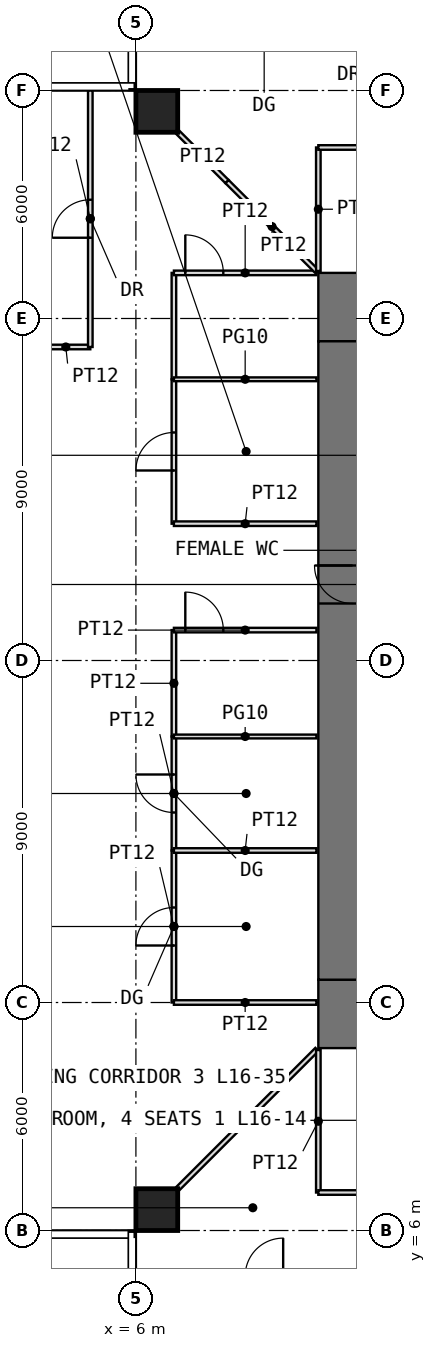
"""IFC4 building model, lengths in metres.
Left out: names, types, materials, properties, quantities, classifications, styles, units other than length and angle.
Written with IfcOpenShell. Run it as: python <this file> out.ifc"""

import sys

from ifc_helpers import new_model, si_unit, direction, frame, frame_2d, origin, origin_2d, place, context, subcontext, project, spatial, rectangle, extrude, element, fill, save


model = new_model("IFC4")
c1 = context("Model", 3, precision=1e-05, world=origin(), true_north=direction((0.0, 1.0)))
c2 = subcontext(c1, "Body", "Model", "MODEL_VIEW")
j1 = project(units=[si_unit("LENGTHUNIT", "METRE"), si_unit("PLANEANGLEUNIT", "RADIAN")], contexts=[c1])
p1 = place(None, origin())
s1 = spatial("IfcSite", under=j1, at=p1, CompositionType="ELEMENT")
p2 = place(p1, origin())
s2 = spatial("IfcBuilding", under=s1, at=p2, CompositionType="ELEMENT")
p3 = place(p2, frame((0.0, 0.0, 70.5)))
s3 = spatial("IfcBuildingStorey", under=s2, at=p3, CompositionType="ELEMENT", Elevation=70.5)
for number, where, z_axis, x_axis in (
    (1, (6.55, 6.55, 0.0), (0.0, 0.0, 1.0), (1.0, 0.0, 0.0)),
    (2, (6.55, 35.45, 0.0), (0.0, 0.0, 1.0), (1.0, 0.0, 0.0)),
):
    element("IfcColumn", number, at=place(p3, frame(where, z_axis=z_axis, x_axis=x_axis)), inside=s3, PredefinedType="COLUMN", context=c2, shape_type="SweptSolid", body=[
        extrude(rectangle(XDim=1.1, YDim=1.1, at=origin_2d()), origin(), (0.0, 0.0, 1.0), 4.0),
    ])
p4 = place(p3, frame((10.8, 11.7, -0.05), z_axis=(0.0, 0.0, 1.0), x_axis=(1.0, 0.0, 0.0)))
e3 = element("IfcWall", 3, at=p4, inside=s3, PredefinedType="SHEAR", context=c2, shape_type="SweptSolid", body=[
    extrude(rectangle(XDim=20.4, YDim=1.8, at=frame_2d((10.2, 0.0))), origin(), (0.0, 0.0, 1.0), 4.0),
])
p5 = place(p4, frame((9.2, 0.0, 0.05)))
e4 = element("IfcOpeningElement", 4, at=p5, cuts=e3, PredefinedType="OPENING", context=c2, shape_type="SweptSolid", body=[
    extrude(rectangle(XDim=2.0, YDim=2.2, at=frame_2d((1.0, 1.1))), frame((0.0, 0.91, 0.0), z_axis=(0.0, -1.0, 0.0), x_axis=(1.0, 0.0, 0.0)), (0.0, 0.0, 1.0), 1.82),
])
p6 = place(p3, frame((10.8, 30.3, -0.05), z_axis=(0.0, 0.0, 1.0), x_axis=(1.0, 0.0, 0.0)))
e5 = element("IfcWall", 5, at=p6, inside=s3, PredefinedType="SHEAR", context=c2, shape_type="SweptSolid", body=[
    extrude(rectangle(XDim=20.4, YDim=1.8, at=frame_2d((10.2, 0.0))), origin(), (0.0, 0.0, 1.0), 4.0),
])
p7 = place(p6, frame((9.2, 0.0, 0.05)))
e6 = element("IfcOpeningElement", 6, at=p7, cuts=e5, PredefinedType="OPENING", context=c2, shape_type="SweptSolid", body=[
    extrude(rectangle(XDim=2.0, YDim=2.2, at=frame_2d((1.0, 1.1))), frame((0.0, 0.91, 0.0), z_axis=(0.0, -1.0, 0.0), x_axis=(1.0, 0.0, 0.0)), (0.0, 0.0, 1.0), 1.82),
])
p8 = place(p3, frame((11.7, 12.6, -0.05), z_axis=(0.0, 0.0, 1.0), x_axis=(0.0, 1.0, 0.0)))
e7 = element("IfcWall", 7, at=p8, inside=s3, PredefinedType="SHEAR", context=c2, shape_type="SweptSolid", body=[
    extrude(rectangle(XDim=16.8, YDim=1.8, at=frame_2d((8.4, 0.0))), origin(), (0.0, 0.0, 1.0), 4.0),
])
p9 = place(p8, frame((9.9, 0.0, 0.05)))
e8 = element("IfcOpeningElement", 8, at=p9, cuts=e7, PredefinedType="OPENING", context=c2, shape_type="SweptSolid", body=[
    extrude(rectangle(XDim=1.0, YDim=2.2, at=frame_2d((0.5, 1.1))), frame((0.0, 0.91, 0.0), z_axis=(0.0, -1.0, 0.0), x_axis=(1.0, 0.0, 0.0)), (0.0, 0.0, 1.0), 1.82),
])
p10 = place(p3, frame((3.51, 29.25, 0.0), z_axis=(0.0, 0.0, 1.0), x_axis=(1.0, 0.0, 0.0)))
e9 = element("IfcWall", 9, at=p10, inside=s3, PredefinedType="PARTITIONING", context=c2, shape_type="SweptSolid", body=[
    extrude(rectangle(XDim=1.29, YDim=0.12, at=frame_2d((0.645, 0.0))), origin(), (0.0, 0.0, 1.0), 3.75),
])
p11 = place(p3, frame((4.8, 29.25, 0.0), z_axis=(0.0, 0.0, 1.0), x_axis=(0.0, 1.0, 0.0)))
e10 = element("IfcWall", 10, at=p11, inside=s3, PredefinedType="PARTITIONING", context=c2, shape_type="SweptSolid", body=[
    extrude(rectangle(XDim=6.75, YDim=0.12, at=frame_2d((3.375, 0.0))), origin(), (0.0, 0.0, 1.0), 3.75),
])
p12 = place(p11, frame((2.875, 0.0, 0.0)))
e11 = element("IfcOpeningElement", 11, at=p12, cuts=e10, PredefinedType="OPENING", context=c2, shape_type="SweptSolid", body=[
    extrude(rectangle(XDim=1.0, YDim=2.2, at=frame_2d((0.5, 1.1))), frame((0.0, 0.07, 0.0), z_axis=(0.0, -1.0, 0.0), x_axis=(1.0, 0.0, 0.0)), (0.0, 0.0, 1.0), 0.14),
])
p13 = place(p3, frame((7.0, 12.0, 0.0), z_axis=(0.0, 0.0, 1.0), x_axis=(0.0, 1.0, 0.0)))
e12 = element("IfcWall", 12, at=p13, inside=s3, PredefinedType="PARTITIONING", context=c2, shape_type="SweptSolid", body=[
    extrude(rectangle(XDim=4.0, YDim=0.12, at=frame_2d((2.0, 0.0))), origin(), (0.0, 0.0, 1.0), 3.75),
])
p14 = place(p13, frame((1.5, 0.0, 0.0)))
e13 = element("IfcOpeningElement", 13, at=p14, cuts=e12, PredefinedType="OPENING", context=c2, shape_type="SweptSolid", body=[
    extrude(rectangle(XDim=1.0, YDim=2.4, at=frame_2d((0.5, 1.2))), frame((0.0, 0.07, 0.0), z_axis=(0.0, -1.0, 0.0), x_axis=(1.0, 0.0, 0.0)), (0.0, 0.0, 1.0), 0.14),
])
p15 = place(p3, frame((7.0, 12.0, 0.0), z_axis=(0.0, 0.0, 1.0), x_axis=(1.0, 0.0, 0.0)))
e14 = element("IfcWall", 14, at=p15, inside=s3, PredefinedType="PARTITIONING", context=c2, shape_type="SweptSolid", body=[
    extrude(rectangle(XDim=3.75, YDim=0.12, at=frame_2d((1.875, 0.0))), origin(), (0.0, 0.0, 1.0), 3.75),
])
p16 = place(p3, frame((7.0, 16.0, 0.0), z_axis=(0.0, 0.0, 1.0), x_axis=(0.0, 1.0, 0.0)))
e15 = element("IfcWall", 15, at=p16, inside=s3, PredefinedType="PARTITIONING", context=c2, shape_type="SweptSolid", body=[
    extrude(rectangle(XDim=3.0, YDim=0.12, at=frame_2d((1.5, 0.0))), origin(), (0.0, 0.0, 1.0), 3.75),
])
p17 = place(p16, frame((1.0, 0.0, 0.0)))
e16 = element("IfcOpeningElement", 16, at=p17, cuts=e15, PredefinedType="OPENING", context=c2, shape_type="SweptSolid", body=[
    extrude(rectangle(XDim=1.0, YDim=2.4, at=frame_2d((0.5, 1.2))), frame((0.0, 0.07, 0.0), z_axis=(0.0, -1.0, 0.0), x_axis=(1.0, 0.0, 0.0)), (0.0, 0.0, 1.0), 0.14),
])
p18 = place(p3, frame((7.0, 16.0, 0.0), z_axis=(0.0, 0.0, 1.0), x_axis=(1.0, 0.0, 0.0)))
e17 = element("IfcWall", 17, at=p18, inside=s3, PredefinedType="PARTITIONING", context=c2, shape_type="SweptSolid", body=[
    extrude(rectangle(XDim=3.75, YDim=0.12, at=frame_2d((1.875, 0.0))), origin(), (0.0, 0.0, 1.0), 3.75),
])
p19 = place(p3, frame((7.0, 19.0, 0.0), z_axis=(0.0, 0.0, 1.0), x_axis=(0.0, 1.0, 0.0)))
e18 = element("IfcWall", 18, at=p19, inside=s3, PredefinedType="PARTITIONING", context=c2, shape_type="SweptSolid", body=[
    extrude(rectangle(XDim=2.8, YDim=0.12, at=frame_2d((1.4, 0.0))), origin(), (0.0, 0.0, 1.0), 3.75),
])
p20 = place(p3, frame((7.0, 19.0, 0.0), z_axis=(0.0, 0.0, 1.0), x_axis=(1.0, 0.0, 0.0)))
e19 = element("IfcWall", 19, at=p20, inside=s3, PredefinedType="PARTITIONING", context=c2, shape_type="SweptSolid", body=[
    extrude(rectangle(XDim=3.75, YDim=0.1, at=frame_2d((1.875, 0.0))), origin(), (0.0, 0.0, 1.0), 3.75),
])
p21 = place(p3, frame((7.0, 21.8, 0.0), z_axis=(0.0, 0.0, 1.0), x_axis=(1.0, 0.0, 0.0)))
e20 = element("IfcWall", 20, at=p21, inside=s3, PredefinedType="PARTITIONING", context=c2, shape_type="SweptSolid", body=[
    extrude(rectangle(XDim=3.75, YDim=0.12, at=frame_2d((1.875, 0.0))), origin(), (0.0, 0.0, 1.0), 3.75),
])
p22 = place(p21, frame((0.3, 0.0, 0.0)))
e21 = element("IfcOpeningElement", 21, at=p22, cuts=e20, PredefinedType="OPENING", context=c2, shape_type="SweptSolid", body=[
    extrude(rectangle(XDim=1.0, YDim=2.4, at=frame_2d((0.5, 1.2))), frame((0.0, 0.07, 0.0), z_axis=(0.0, -1.0, 0.0), x_axis=(1.0, 0.0, 0.0)), (0.0, 0.0, 1.0), 0.14),
])
p23 = place(p3, frame((7.0, 24.6, 0.0), z_axis=(0.0, 0.0, 1.0), x_axis=(0.0, 1.0, 0.0)))
e22 = element("IfcWall", 22, at=p23, inside=s3, PredefinedType="PARTITIONING", context=c2, shape_type="SweptSolid", body=[
    extrude(rectangle(XDim=3.8, YDim=0.12, at=frame_2d((1.9, 0.0))), origin(), (0.0, 0.0, 1.0), 3.75),
])
p24 = place(p23, frame((1.4, 0.0, 0.0)))
e23 = element("IfcOpeningElement", 23, at=p24, cuts=e22, PredefinedType="OPENING", context=c2, shape_type="SweptSolid", body=[
    extrude(rectangle(XDim=1.0, YDim=2.4, at=frame_2d((0.5, 1.2))), frame((0.0, 0.07, 0.0), z_axis=(0.0, -1.0, 0.0), x_axis=(1.0, 0.0, 0.0)), (0.0, 0.0, 1.0), 0.14),
])
p25 = place(p3, frame((7.0, 24.6, 0.0), z_axis=(0.0, 0.0, 1.0), x_axis=(1.0, 0.0, 0.0)))
e24 = element("IfcWall", 24, at=p25, inside=s3, PredefinedType="PARTITIONING", context=c2, shape_type="SweptSolid", body=[
    extrude(rectangle(XDim=3.75, YDim=0.12, at=frame_2d((1.875, 0.0))), origin(), (0.0, 0.0, 1.0), 3.75),
])
p26 = place(p3, frame((7.0, 28.4, 0.0), z_axis=(0.0, 0.0, 1.0), x_axis=(0.0, 1.0, 0.0)))
e25 = element("IfcWall", 25, at=p26, inside=s3, PredefinedType="PARTITIONING", context=c2, shape_type="SweptSolid", body=[
    extrude(rectangle(XDim=2.8, YDim=0.12, at=frame_2d((1.4, 0.0))), origin(), (0.0, 0.0, 1.0), 3.75),
])
p27 = place(p3, frame((7.0, 28.4, 0.0), z_axis=(0.0, 0.0, 1.0), x_axis=(1.0, 0.0, 0.0)))
e26 = element("IfcWall", 26, at=p27, inside=s3, PredefinedType="PARTITIONING", context=c2, shape_type="SweptSolid", body=[
    extrude(rectangle(XDim=3.75, YDim=0.1, at=frame_2d((1.875, 0.0))), origin(), (0.0, 0.0, 1.0), 3.75),
])
p28 = place(p3, frame((7.0, 31.2, 0.0), z_axis=(0.0, 0.0, 1.0), x_axis=(1.0, 0.0, 0.0)))
e27 = element("IfcWall", 27, at=p28, inside=s3, PredefinedType="PARTITIONING", context=c2, shape_type="SweptSolid", body=[
    extrude(rectangle(XDim=3.75, YDim=0.12, at=frame_2d((1.875, 0.0))), origin(), (0.0, 0.0, 1.0), 3.75),
])
p29 = place(p28, frame((0.3, 0.0, 0.0)))
e28 = element("IfcOpeningElement", 28, at=p29, cuts=e27, PredefinedType="OPENING", context=c2, shape_type="SweptSolid", body=[
    extrude(rectangle(XDim=1.0, YDim=2.4, at=frame_2d((0.5, 1.2))), frame((0.0, 0.07, 0.0), z_axis=(0.0, -1.0, 0.0), x_axis=(1.0, 0.0, 0.0)), (0.0, 0.0, 1.0), 0.14),
])
p30 = place(p3, frame((7.11, 7.11, 0.0), z_axis=(0.0, 0.0, 1.0), x_axis=(0.707106781187, 0.707106781187, 0.0)))
e29 = element("IfcWall", 29, at=p30, inside=s3, PredefinedType="PARTITIONING", context=c2, shape_type="SweptSolid", body=[
    extrude(rectangle(XDim=5.168, YDim=0.12, at=frame_2d((2.584, 0.0))), origin(), (0.0, 0.0, 1.0), 3.75),
])
p31 = place(p3, frame((7.11, 34.89, 0.0), z_axis=(0.0, 0.0, 1.0), x_axis=(0.707106781187, -0.707106781187, 0.0)))
e30 = element("IfcWall", 30, at=p31, inside=s3, PredefinedType="PARTITIONING", context=c2, shape_type="SweptSolid", body=[
    extrude(rectangle(XDim=1.822, YDim=0.12, at=frame_2d((0.911, 0.0))), origin(), (0.0, 0.0, 1.0), 3.75),
])
p32 = place(p3, frame((8.398, 33.602, 0.0), z_axis=(0.0, 0.0, 1.0), x_axis=(0.707106781187, -0.707106781187, 0.0)))
e31 = element("IfcWall", 31, at=p32, inside=s3, PredefinedType="PARTITIONING", context=c2, shape_type="SweptSolid", body=[
    extrude(rectangle(XDim=3.346, YDim=0.12, at=frame_2d((1.673, 0.0))), origin(), (0.0, 0.0, 1.0), 3.75),
])
p33 = place(p3, frame((10.8, 7.0, 0.0), z_axis=(0.0, 0.0, 1.0), x_axis=(0.0, 1.0, 0.0)))
e32 = element("IfcWall", 32, at=p33, inside=s3, PredefinedType="PARTITIONING", context=c2, shape_type="SweptSolid", body=[
    extrude(rectangle(XDim=3.75, YDim=0.12, at=frame_2d((1.875, 0.0))), origin(), (0.0, 0.0, 1.0), 3.75),
])
p34 = place(p3, frame((10.8, 7.0, 0.0), z_axis=(0.0, 0.0, 1.0), x_axis=(1.0, 0.0, 0.0)))
e33 = element("IfcWall", 33, at=p34, inside=s3, PredefinedType="PARTITIONING", context=c2, shape_type="SweptSolid", body=[
    extrude(rectangle(XDim=3.8, YDim=0.12, at=frame_2d((1.9, 0.0))), origin(), (0.0, 0.0, 1.0), 3.75),
])
p35 = place(p34, frame((1.4, 0.0, 0.0)))
e34 = element("IfcOpeningElement", 34, at=p35, cuts=e33, PredefinedType="OPENING", context=c2, shape_type="SweptSolid", body=[
    extrude(rectangle(XDim=1.0, YDim=2.4, at=frame_2d((0.5, 1.2))), frame((0.0, 0.07, 0.0), z_axis=(0.0, -1.0, 0.0), x_axis=(1.0, 0.0, 0.0)), (0.0, 0.0, 1.0), 0.14),
])
p36 = place(p3, frame((10.8, 31.25, 0.0), z_axis=(0.0, 0.0, 1.0), x_axis=(0.0, 1.0, 0.0)))
e35 = element("IfcWall", 35, at=p36, inside=s3, PredefinedType="PARTITIONING", context=c2, shape_type="SweptSolid", body=[
    extrude(rectangle(XDim=3.25, YDim=0.12, at=frame_2d((1.625, 0.0))), origin(), (0.0, 0.0, 1.0), 3.75),
])
p37 = place(p3, frame((10.8, 34.5, 0.0), z_axis=(0.0, 0.0, 1.0), x_axis=(1.0, 0.0, 0.0)))
e36 = element("IfcWall", 36, at=p37, inside=s3, PredefinedType="PARTITIONING", context=c2, shape_type="SweptSolid", body=[
    extrude(rectangle(XDim=3.8, YDim=0.12, at=frame_2d((1.9, 0.0))), origin(), (0.0, 0.0, 1.0), 3.75),
])
p38 = place(p37, frame((1.4, 0.0, 0.0)))
e37 = element("IfcOpeningElement", 37, at=p38, cuts=e36, PredefinedType="OPENING", context=c2, shape_type="SweptSolid", body=[
    extrude(rectangle(XDim=1.0, YDim=2.2, at=frame_2d((0.5, 1.1))), frame((0.0, 0.07, 0.0), z_axis=(0.0, -1.0, 0.0), x_axis=(1.0, 0.0, 0.0)), (0.0, 0.0, 1.0), 0.14),
])
p39 = place(p9, origin())
e38 = element("IfcDoor", 38, at=p39, inside=s3, OperationType="SINGLE_SWING_RIGHT", PredefinedType="DOOR", context=c2, shape_type="SweptSolid", body=[
    extrude(rectangle(XDim=1.0, YDim=2.2, at=frame_2d((0.5, 1.1))), frame((0.0, 0.025, 0.0), z_axis=(0.0, -1.0, 0.0), x_axis=(1.0, 0.0, 0.0)), (0.0, 0.0, 1.0), 0.05),
])
fill(e8, e38)
p40 = place(p14, origin())
e39 = element("IfcDoor", 39, at=p40, inside=s3, OperationType="SINGLE_SWING_LEFT", PredefinedType="DOOR", context=c2, shape_type="SweptSolid", body=[
    extrude(rectangle(XDim=1.0, YDim=2.4, at=frame_2d((0.5, 1.2))), frame((0.0, 0.025, 0.0), z_axis=(0.0, -1.0, 0.0), x_axis=(1.0, 0.0, 0.0)), (0.0, 0.0, 1.0), 0.05),
])
fill(e13, e39)
p41 = place(p17, origin())
e40 = element("IfcDoor", 40, at=p41, inside=s3, OperationType="SINGLE_SWING_RIGHT", PredefinedType="DOOR", context=c2, shape_type="SweptSolid", body=[
    extrude(rectangle(XDim=1.0, YDim=2.4, at=frame_2d((0.5, 1.2))), frame((0.0, 0.025, 0.0), z_axis=(0.0, -1.0, 0.0), x_axis=(1.0, 0.0, 0.0)), (0.0, 0.0, 1.0), 0.05),
])
fill(e16, e40)
p42 = place(p24, origin())
e41 = element("IfcDoor", 41, at=p42, inside=s3, OperationType="SINGLE_SWING_LEFT", PredefinedType="DOOR", context=c2, shape_type="SweptSolid", body=[
    extrude(rectangle(XDim=1.0, YDim=2.4, at=frame_2d((0.5, 1.2))), frame((0.0, 0.025, 0.0), z_axis=(0.0, -1.0, 0.0), x_axis=(1.0, 0.0, 0.0)), (0.0, 0.0, 1.0), 0.05),
])
fill(e23, e41)
p43 = place(p12, origin())
e42 = element("IfcDoor", 42, at=p43, inside=s3, OperationType="SINGLE_SWING_LEFT", PredefinedType="DOOR", context=c2, shape_type="SweptSolid", body=[
    extrude(rectangle(XDim=1.0, YDim=2.2, at=frame_2d((0.5, 1.1))), frame((0.0, 0.025, 0.0), z_axis=(0.0, -1.0, 0.0), x_axis=(1.0, 0.0, 0.0)), (0.0, 0.0, 1.0), 0.05),
])
fill(e11, e42)
p44 = place(p29, origin())
e43 = element("IfcDoor", 43, at=p44, inside=s3, OperationType="SINGLE_SWING_LEFT", PredefinedType="DOOR", context=c2, shape_type="SweptSolid", body=[
    extrude(rectangle(XDim=1.0, YDim=2.4, at=frame_2d((0.5, 1.2))), frame((0.0, 0.025, 0.0), z_axis=(0.0, -1.0, 0.0), x_axis=(1.0, 0.0, 0.0)), (0.0, 0.0, 1.0), 0.05),
])
fill(e28, e43)
p45 = place(p22, origin())
e44 = element("IfcDoor", 44, at=p45, inside=s3, OperationType="SINGLE_SWING_LEFT", PredefinedType="DOOR", context=c2, shape_type="SweptSolid", body=[
    extrude(rectangle(XDim=1.0, YDim=2.4, at=frame_2d((0.5, 1.2))), frame((0.0, 0.025, 0.0), z_axis=(0.0, -1.0, 0.0), x_axis=(1.0, 0.0, 0.0)), (0.0, 0.0, 1.0), 0.05),
])
fill(e21, e44)
save(model, sys.argv[1])
